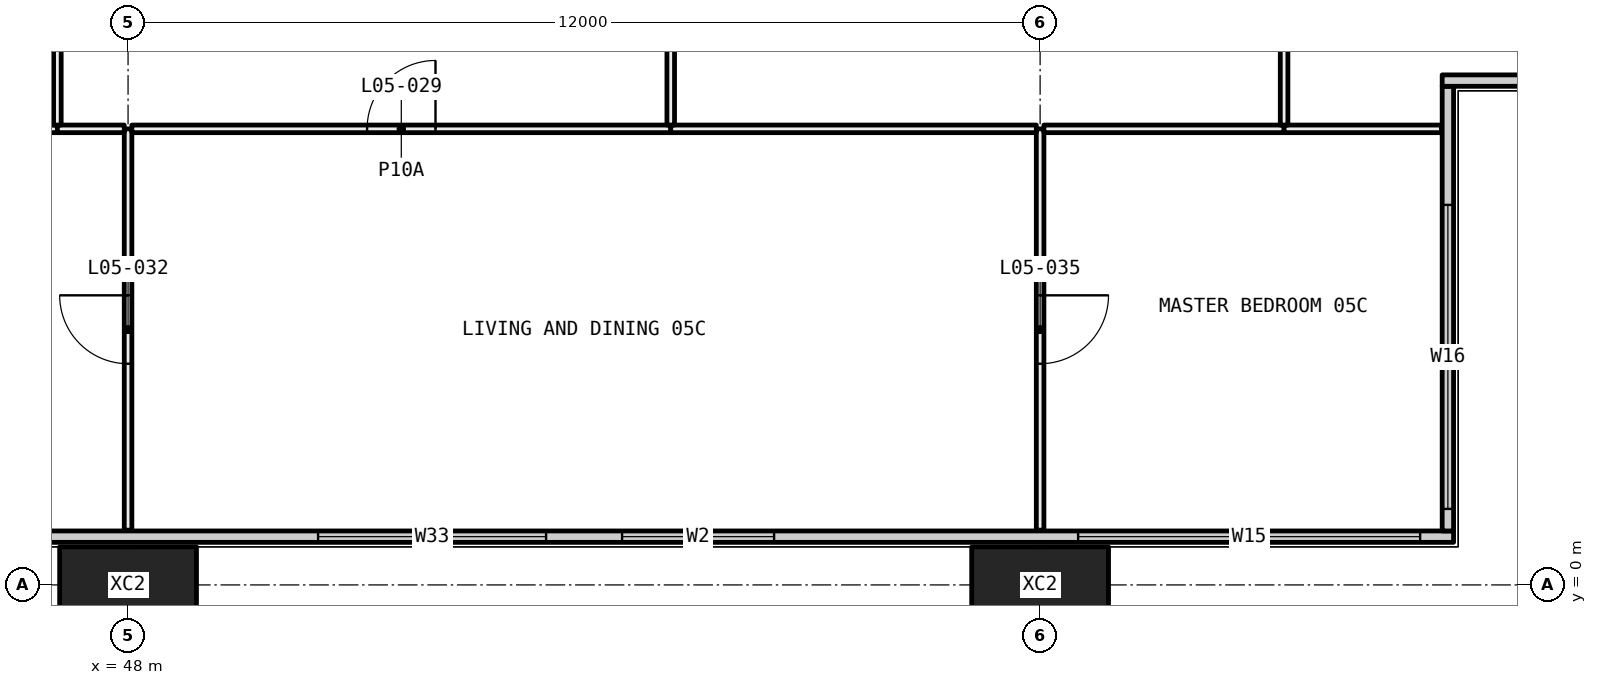
"""IFC4 building model, lengths in metres.
Left out: names, types, materials, properties, quantities, classifications, styles, units other than length and angle.
Written with IfcOpenShell. Run it as: python <this file> out.ifc"""

import sys

from ifc_helpers import new_model, si_unit, direction, frame, frame_2d, origin, origin_2d, place, context, subcontext, project, spatial, rectangle, hollow_rectangle, extrude, element, fill, save


model = new_model("IFC4")
c1 = context("Model", 3, precision=1e-05, world=origin(), true_north=direction((0.0, 1.0)))
c2 = subcontext(c1, "Body", "Model", "MODEL_VIEW")
j1 = project(units=[si_unit("LENGTHUNIT", "METRE"), si_unit("PLANEANGLEUNIT", "RADIAN")], contexts=[c1])
p1 = place(None, origin())
s1 = spatial("IfcSite", under=j1, at=p1, CompositionType="ELEMENT")
p2 = place(p1, origin())
s2 = spatial("IfcBuilding", under=s1, at=p2, CompositionType="ELEMENT")
p3 = place(p2, frame((0.0, 0.0, 30.0)))
s3 = spatial("IfcBuildingStorey", under=s2, at=p3, CompositionType="ELEMENT", Elevation=30.0)
for number, where, z_axis, x_axis in (
    (1, (48.0, 0.0, -0.4), (0.0, 0.0, 1.0), (1.0, 0.0, 0.0)),
    (2, (60.0, 0.0, -0.4), (0.0, 0.0, 1.0), (1.0, 0.0, 0.0)),
):
    element("IfcColumn", number, at=place(p3, frame(where, z_axis=z_axis, x_axis=x_axis)), inside=s3, PredefinedType="COLUMN", context=c2, shape_type="SweptSolid", body=[
        extrude(hollow_rectangle(XDim=1.8, YDim=1.0, WallThickness=0.07, at=origin_2d()), origin(), (0.0, 0.0, 1.0), 3.45),
    ])
p4 = place(p3, frame((6.56, 0.635, 0.0), z_axis=(0.0, 0.0, 1.0), x_axis=(1.0, 0.0, 0.0)))
e3 = element("IfcWall", 3, at=p4, inside=s3, PredefinedType="ELEMENTEDWALL", context=c2, shape_type="SweptSolid", body=[
    extrude(rectangle(XDim=58.88, YDim=0.15, at=frame_2d((29.44, 0.0))), origin(), (0.0, 0.0, 1.0), 3.05),
])
p5 = place(p4, frame((0.44, 0.0, 0.45)))
e4 = element("IfcOpeningElement", 4, at=p5, cuts=e3, PredefinedType="OPENING", context=c2, shape_type="SweptSolid", body=[
    extrude(rectangle(XDim=4.5, YDim=2.55, at=frame_2d((2.25, 1.275))), frame((0.0, 0.085, 0.0), z_axis=(0.0, -1.0, 0.0), x_axis=(1.0, 0.0, 0.0)), (0.0, 0.0, 1.0), 0.17),
])
p6 = place(p4, frame((7.94, 0.0, 0.45)))
e5 = element("IfcOpeningElement", 5, at=p6, cuts=e3, PredefinedType="OPENING", context=c2, shape_type="SweptSolid", body=[
    extrude(rectangle(XDim=3.0, YDim=2.55, at=frame_2d((1.5, 1.275))), frame((0.0, 0.085, 0.0), z_axis=(0.0, -1.0, 0.0), x_axis=(1.0, 0.0, 0.0)), (0.0, 0.0, 1.0), 0.17),
])
p7 = place(p4, frame((11.94, 0.0, 0.45)))
e6 = element("IfcOpeningElement", 6, at=p7, cuts=e3, PredefinedType="OPENING", context=c2, shape_type="SweptSolid", body=[
    extrude(rectangle(XDim=3.0, YDim=2.55, at=frame_2d((1.5, 1.275))), frame((0.0, 0.085, 0.0), z_axis=(0.0, -1.0, 0.0), x_axis=(1.0, 0.0, 0.0)), (0.0, 0.0, 1.0), 0.17),
])
p8 = place(p4, frame((19.94, 0.0, 0.45)))
e7 = element("IfcOpeningElement", 7, at=p8, cuts=e3, PredefinedType="OPENING", context=c2, shape_type="SweptSolid", body=[
    extrude(rectangle(XDim=3.0, YDim=2.55, at=frame_2d((1.5, 1.275))), frame((0.0, 0.085, 0.0), z_axis=(0.0, -1.0, 0.0), x_axis=(1.0, 0.0, 0.0)), (0.0, 0.0, 1.0), 0.17),
])
p9 = place(p4, frame((23.94, 0.0, 0.45)))
e8 = element("IfcOpeningElement", 8, at=p9, cuts=e3, PredefinedType="OPENING", context=c2, shape_type="SweptSolid", body=[
    extrude(rectangle(XDim=2.0, YDim=2.55, at=frame_2d((1.0, 1.275))), frame((0.0, 0.085, 0.0), z_axis=(0.0, -1.0, 0.0), x_axis=(1.0, 0.0, 0.0)), (0.0, 0.0, 1.0), 0.17),
])
p10 = place(p4, frame((31.94, 0.0, 0.45)))
e9 = element("IfcOpeningElement", 9, at=p10, cuts=e3, PredefinedType="OPENING", context=c2, shape_type="SweptSolid", body=[
    extrude(rectangle(XDim=3.0, YDim=2.55, at=frame_2d((1.5, 1.275))), frame((0.0, 0.085, 0.0), z_axis=(0.0, -1.0, 0.0), x_axis=(1.0, 0.0, 0.0)), (0.0, 0.0, 1.0), 0.17),
])
p11 = place(p4, frame((35.94, 0.0, 0.45)))
e10 = element("IfcOpeningElement", 10, at=p11, cuts=e3, PredefinedType="OPENING", context=c2, shape_type="SweptSolid", body=[
    extrude(rectangle(XDim=3.0, YDim=2.55, at=frame_2d((1.5, 1.275))), frame((0.0, 0.085, 0.0), z_axis=(0.0, -1.0, 0.0), x_axis=(1.0, 0.0, 0.0)), (0.0, 0.0, 1.0), 0.17),
])
p12 = place(p4, frame((43.94, 0.0, 0.45)))
e11 = element("IfcOpeningElement", 11, at=p12, cuts=e3, PredefinedType="OPENING", context=c2, shape_type="SweptSolid", body=[
    extrude(rectangle(XDim=3.0, YDim=2.55, at=frame_2d((1.5, 1.275))), frame((0.0, 0.085, 0.0), z_axis=(0.0, -1.0, 0.0), x_axis=(1.0, 0.0, 0.0)), (0.0, 0.0, 1.0), 0.17),
])
p13 = place(p4, frame((47.94, 0.0, 0.45)))
e12 = element("IfcOpeningElement", 12, at=p13, cuts=e3, PredefinedType="OPENING", context=c2, shape_type="SweptSolid", body=[
    extrude(rectangle(XDim=2.0, YDim=2.55, at=frame_2d((1.0, 1.275))), frame((0.0, 0.085, 0.0), z_axis=(0.0, -1.0, 0.0), x_axis=(1.0, 0.0, 0.0)), (0.0, 0.0, 1.0), 0.17),
])
p14 = place(p4, frame((53.94, 0.0, 0.45)))
e13 = element("IfcOpeningElement", 13, at=p14, cuts=e3, PredefinedType="OPENING", context=c2, shape_type="SweptSolid", body=[
    extrude(rectangle(XDim=4.5, YDim=2.55, at=frame_2d((2.25, 1.275))), frame((0.0, 0.085, 0.0), z_axis=(0.0, -1.0, 0.0), x_axis=(1.0, 0.0, 0.0)), (0.0, 0.0, 1.0), 0.17),
])
p15 = place(p3, frame((65.365, 0.71, 0.0), z_axis=(0.0, 0.0, 1.0), x_axis=(0.0, 1.0, 0.0)))
e14 = element("IfcWall", 14, at=p15, inside=s3, PredefinedType="ELEMENTEDWALL", context=c2, shape_type="SweptSolid", body=[
    extrude(rectangle(XDim=5.85, YDim=0.15, at=frame_2d((2.925, 0.0))), origin(), (0.0, 0.0, 1.0), 3.05),
])
p16 = place(p15, frame((0.29, 0.0, 0.45)))
e15 = element("IfcOpeningElement", 15, at=p16, cuts=e14, PredefinedType="OPENING", context=c2, shape_type="SweptSolid", body=[
    extrude(rectangle(XDim=4.0, YDim=2.55, at=frame_2d((2.0, 1.275))), frame((0.0, 0.085, 0.0), z_axis=(0.0, -1.0, 0.0), x_axis=(1.0, 0.0, 0.0)), (0.0, 0.0, 1.0), 0.17),
])
p17 = place(p3, frame((65.29, 6.635, 0.0), z_axis=(0.0, 0.0, 1.0), x_axis=(1.0, 0.0, 0.0)))
e16 = element("IfcWall", 16, at=p17, inside=s3, PredefinedType="ELEMENTEDWALL", context=c2, shape_type="SweptSolid", body=[
    extrude(rectangle(XDim=6.15, YDim=0.15, at=frame_2d((3.075, 0.0))), origin(), (0.0, 0.0, 1.0), 3.05),
])
p18 = place(p17, frame((1.71, 0.0, 0.45)))
e17 = element("IfcOpeningElement", 17, at=p18, cuts=e16, PredefinedType="OPENING", context=c2, shape_type="SweptSolid", body=[
    extrude(rectangle(XDim=4.0, YDim=2.55, at=frame_2d((2.0, 1.275))), frame((0.0, 0.085, 0.0), z_axis=(0.0, -1.0, 0.0), x_axis=(1.0, 0.0, 0.0)), (0.0, 0.0, 1.0), 0.17),
])
p19 = place(p3, frame((48.0, 0.72, 0.0), z_axis=(0.0, 0.0, 1.0), x_axis=(0.0, 1.0, 0.0)))
e18 = element("IfcWall", 18, at=p19, inside=s3, PredefinedType="PARTITIONING", context=c2, shape_type="SweptSolid", body=[
    extrude(rectangle(XDim=5.28, YDim=0.1, at=frame_2d((2.64, 0.0))), origin(), (0.0, 0.0, 1.0), 2.45),
])
p20 = place(p19, frame((2.19, 0.0, 0.0)))
e19 = element("IfcOpeningElement", 19, at=p20, cuts=e18, PredefinedType="OPENING", context=c2, shape_type="SweptSolid", body=[
    extrude(rectangle(XDim=0.9, YDim=2.1, at=frame_2d((0.45, 1.05))), frame((0.0, 0.06, 0.0), z_axis=(0.0, -1.0, 0.0), x_axis=(1.0, 0.0, 0.0)), (0.0, 0.0, 1.0), 0.12),
])
p21 = place(p3, frame((47.07, 6.0, 0.0), z_axis=(0.0, 0.0, 1.0), x_axis=(-1.0, 0.0, 0.0)))
e20 = element("IfcWall", 20, at=p21, inside=s3, PredefinedType="PARTITIONING", context=c2, shape_type="SweptSolid", body=[
    extrude(rectangle(XDim=5.02, YDim=0.1, at=frame_2d((2.51, 0.0))), origin(), (0.0, 0.0, 1.0), 3.05),
])
p22 = place(p3, frame((47.95, 6.0, 0.0), z_axis=(0.0, 0.0, 1.0), x_axis=(-1.0, 0.0, 0.0)))
e21 = element("IfcWall", 21, at=p22, inside=s3, PredefinedType="PARTITIONING", context=c2, shape_type="SweptSolid", body=[
    extrude(rectangle(XDim=0.88, YDim=0.1, at=frame_2d((0.44, 0.0))), origin(), (0.0, 0.0, 1.0), 2.45),
])
p23 = place(p3, frame((60.0, 0.72, 0.0), z_axis=(0.0, 0.0, 1.0), x_axis=(0.0, 1.0, 0.0)))
e22 = element("IfcWall", 22, at=p23, inside=s3, PredefinedType="PARTITIONING", context=c2, shape_type="SweptSolid", body=[
    extrude(rectangle(XDim=5.28, YDim=0.1, at=frame_2d((2.64, 0.0))), origin(), (0.0, 0.0, 1.0), 2.45),
])
p24 = place(p23, frame((2.19, 0.0, 0.0)))
e23 = element("IfcOpeningElement", 23, at=p24, cuts=e22, PredefinedType="OPENING", context=c2, shape_type="SweptSolid", body=[
    extrude(rectangle(XDim=0.9, YDim=2.1, at=frame_2d((0.45, 1.05))), frame((0.0, 0.06, 0.0), z_axis=(0.0, -1.0, 0.0), x_axis=(1.0, 0.0, 0.0)), (0.0, 0.0, 1.0), 0.12),
])
p25 = place(p3, frame((55.14, 6.0, 0.0), z_axis=(0.0, 0.0, 1.0), x_axis=(-1.0, 0.0, 0.0)))
e24 = element("IfcWall", 24, at=p25, inside=s3, PredefinedType="PARTITIONING", context=c2, shape_type="SweptSolid", body=[
    extrude(rectangle(XDim=7.09, YDim=0.1, at=frame_2d((3.545, 0.0))), origin(), (0.0, 0.0, 1.0), 2.45),
])
p26 = place(p25, frame((3.095, 0.0, 0.0)))
e25 = element("IfcOpeningElement", 25, at=p26, cuts=e24, PredefinedType="OPENING", context=c2, shape_type="SweptSolid", body=[
    extrude(rectangle(XDim=0.9, YDim=2.1, at=frame_2d((0.45, 1.05))), frame((0.0, 0.06, 0.0), z_axis=(0.0, -1.0, 0.0), x_axis=(1.0, 0.0, 0.0)), (0.0, 0.0, 1.0), 0.12),
])
p27 = place(p3, frame((59.95, 6.0, 0.0), z_axis=(0.0, 0.0, 1.0), x_axis=(-1.0, 0.0, 0.0)))
e26 = element("IfcWall", 26, at=p27, inside=s3, PredefinedType="PARTITIONING", context=c2, shape_type="SweptSolid", body=[
    extrude(rectangle(XDim=4.81, YDim=0.1, at=frame_2d((2.405, 0.0))), origin(), (0.0, 0.0, 1.0), 2.45),
])
p28 = place(p3, frame((63.21, 6.0, 0.0), z_axis=(0.0, 0.0, 1.0), x_axis=(-1.0, 0.0, 0.0)))
e27 = element("IfcWall", 27, at=p28, inside=s3, PredefinedType="PARTITIONING", context=c2, shape_type="SweptSolid", body=[
    extrude(rectangle(XDim=3.16, YDim=0.1, at=frame_2d((1.58, 0.0))), origin(), (0.0, 0.0, 1.0), 2.45),
])
p29 = place(p3, frame((65.28, 6.0, 0.0), z_axis=(0.0, 0.0, 1.0), x_axis=(-1.0, 0.0, 0.0)))
e28 = element("IfcWall", 28, at=p29, inside=s3, PredefinedType="PARTITIONING", context=c2, shape_type="SweptSolid", body=[
    extrude(rectangle(XDim=2.07, YDim=0.1, at=frame_2d((1.035, 0.0))), origin(), (0.0, 0.0, 1.0), 3.05),
])
p30 = place(p3, frame((47.07, 6.05, 0.0), z_axis=(0.0, 0.0, 1.0), x_axis=(0.0, 1.0, 0.0)))
e29 = element("IfcWall", 29, at=p30, inside=s3, PredefinedType="PARTITIONING", context=c2, shape_type="SweptSolid", body=[
    extrude(rectangle(XDim=5.95, YDim=0.1, at=frame_2d((2.975, 0.0))), origin(), (0.0, 0.0, 1.0), 2.45),
])
p31 = place(p30, frame((2.525, 0.0, 0.0)))
e30 = element("IfcOpeningElement", 30, at=p31, cuts=e29, PredefinedType="OPENING", context=c2, shape_type="SweptSolid", body=[
    extrude(rectangle(XDim=0.9, YDim=2.1, at=frame_2d((0.45, 1.05))), frame((0.0, 0.06, 0.0), z_axis=(0.0, -1.0, 0.0), x_axis=(1.0, 0.0, 0.0)), (0.0, 0.0, 1.0), 0.12),
])
p32 = place(p3, frame((55.14, 6.05, 0.0), z_axis=(0.0, 0.0, 1.0), x_axis=(0.0, 1.0, 0.0)))
e31 = element("IfcWall", 31, at=p32, inside=s3, PredefinedType="PARTITIONING", context=c2, shape_type="SweptSolid", body=[
    extrude(rectangle(XDim=5.95, YDim=0.1, at=frame_2d((2.975, 0.0))), origin(), (0.0, 0.0, 1.0), 2.45),
])
p33 = place(p32, frame((2.525, 0.0, 0.0)))
e32 = element("IfcOpeningElement", 32, at=p33, cuts=e31, PredefinedType="OPENING", context=c2, shape_type="SweptSolid", body=[
    extrude(rectangle(XDim=0.9, YDim=2.1, at=frame_2d((0.45, 1.05))), frame((0.0, 0.06, 0.0), z_axis=(0.0, -1.0, 0.0), x_axis=(1.0, 0.0, 0.0)), (0.0, 0.0, 1.0), 0.12),
])
p34 = place(p3, frame((63.21, 6.05, 0.0), z_axis=(0.0, 0.0, 1.0), x_axis=(0.0, 1.0, 0.0)))
e33 = element("IfcWall", 33, at=p34, inside=s3, PredefinedType="PARTITIONING", context=c2, shape_type="SweptSolid", body=[
    extrude(rectangle(XDim=5.875, YDim=0.1, at=frame_2d((2.938, 0.0))), origin(), (0.0, 0.0, 1.0), 2.45),
])
p35 = place(p34, frame((2.488, 0.0, 0.0)))
e34 = element("IfcOpeningElement", 34, at=p35, cuts=e33, PredefinedType="OPENING", context=c2, shape_type="SweptSolid", body=[
    extrude(rectangle(XDim=0.9, YDim=2.1, at=frame_2d((0.45, 1.05))), frame((0.0, 0.06, 0.0), z_axis=(0.0, -1.0, 0.0), x_axis=(1.0, 0.0, 0.0)), (0.0, 0.0, 1.0), 0.12),
])
p36 = place(p12, origin())
e35 = element("IfcWindow", 35, at=p36, inside=s3, PartitioningType="SINGLE_PANEL", PredefinedType="WINDOW", context=c2, shape_type="SweptSolid", body=[
    extrude(rectangle(XDim=3.0, YDim=2.55, at=frame_2d((1.5, 1.275))), frame((0.0, 0.03, 0.0), z_axis=(0.0, -1.0, 0.0), x_axis=(1.0, 0.0, 0.0)), (0.0, 0.0, 1.0), 0.06),
])
fill(e11, e35)
p37 = place(p13, origin())
e36 = element("IfcWindow", 36, at=p37, inside=s3, PartitioningType="SINGLE_PANEL", PredefinedType="WINDOW", context=c2, shape_type="SweptSolid", body=[
    extrude(rectangle(XDim=2.0, YDim=2.55, at=frame_2d((1.0, 1.275))), frame((0.0, 0.03, 0.0), z_axis=(0.0, -1.0, 0.0), x_axis=(1.0, 0.0, 0.0)), (0.0, 0.0, 1.0), 0.06),
])
fill(e12, e36)
p38 = place(p14, origin())
e37 = element("IfcWindow", 37, at=p38, inside=s3, PartitioningType="SINGLE_PANEL", PredefinedType="WINDOW", context=c2, shape_type="SweptSolid", body=[
    extrude(rectangle(XDim=4.5, YDim=2.55, at=frame_2d((2.25, 1.275))), frame((0.0, 0.03, 0.0), z_axis=(0.0, -1.0, 0.0), x_axis=(1.0, 0.0, 0.0)), (0.0, 0.0, 1.0), 0.06),
])
fill(e13, e37)
p39 = place(p16, origin())
e38 = element("IfcWindow", 38, at=p39, inside=s3, PartitioningType="SINGLE_PANEL", PredefinedType="WINDOW", context=c2, shape_type="SweptSolid", body=[
    extrude(rectangle(XDim=4.0, YDim=2.55, at=frame_2d((2.0, 1.275))), frame((0.0, 0.03, 0.0), z_axis=(0.0, -1.0, 0.0), x_axis=(1.0, 0.0, 0.0)), (0.0, 0.0, 1.0), 0.06),
])
fill(e15, e38)
p40 = place(p26, frame((0.9, 0.0, 0.0), x_axis=(-1.0, 0.0, 0.0)))
e39 = element("IfcDoor", 39, at=p40, inside=s3, OperationType="SINGLE_SWING_LEFT", PredefinedType="DOOR", context=c2, shape_type="SweptSolid", body=[
    extrude(rectangle(XDim=0.9, YDim=2.1, at=frame_2d((0.45, 1.05))), frame((0.0, 0.025, 0.0), z_axis=(0.0, -1.0, 0.0), x_axis=(1.0, 0.0, 0.0)), (0.0, 0.0, 1.0), 0.05),
])
fill(e25, e39)
p41 = place(p20, origin())
e40 = element("IfcDoor", 40, at=p41, inside=s3, OperationType="SINGLE_SWING_LEFT", PredefinedType="DOOR", context=c2, shape_type="SweptSolid", body=[
    extrude(rectangle(XDim=0.9, YDim=2.1, at=frame_2d((0.45, 1.05))), frame((0.0, 0.025, 0.0), z_axis=(0.0, -1.0, 0.0), x_axis=(1.0, 0.0, 0.0)), (0.0, 0.0, 1.0), 0.05),
])
fill(e19, e40)
p42 = place(p24, frame((0.9, 0.0, 0.0), x_axis=(-1.0, 0.0, 0.0)))
e41 = element("IfcDoor", 41, at=p42, inside=s3, OperationType="SINGLE_SWING_RIGHT", PredefinedType="DOOR", context=c2, shape_type="SweptSolid", body=[
    extrude(rectangle(XDim=0.9, YDim=2.1, at=frame_2d((0.45, 1.05))), frame((0.0, 0.025, 0.0), z_axis=(0.0, -1.0, 0.0), x_axis=(1.0, 0.0, 0.0)), (0.0, 0.0, 1.0), 0.05),
])
fill(e23, e41)
save(model, sys.argv[1])
